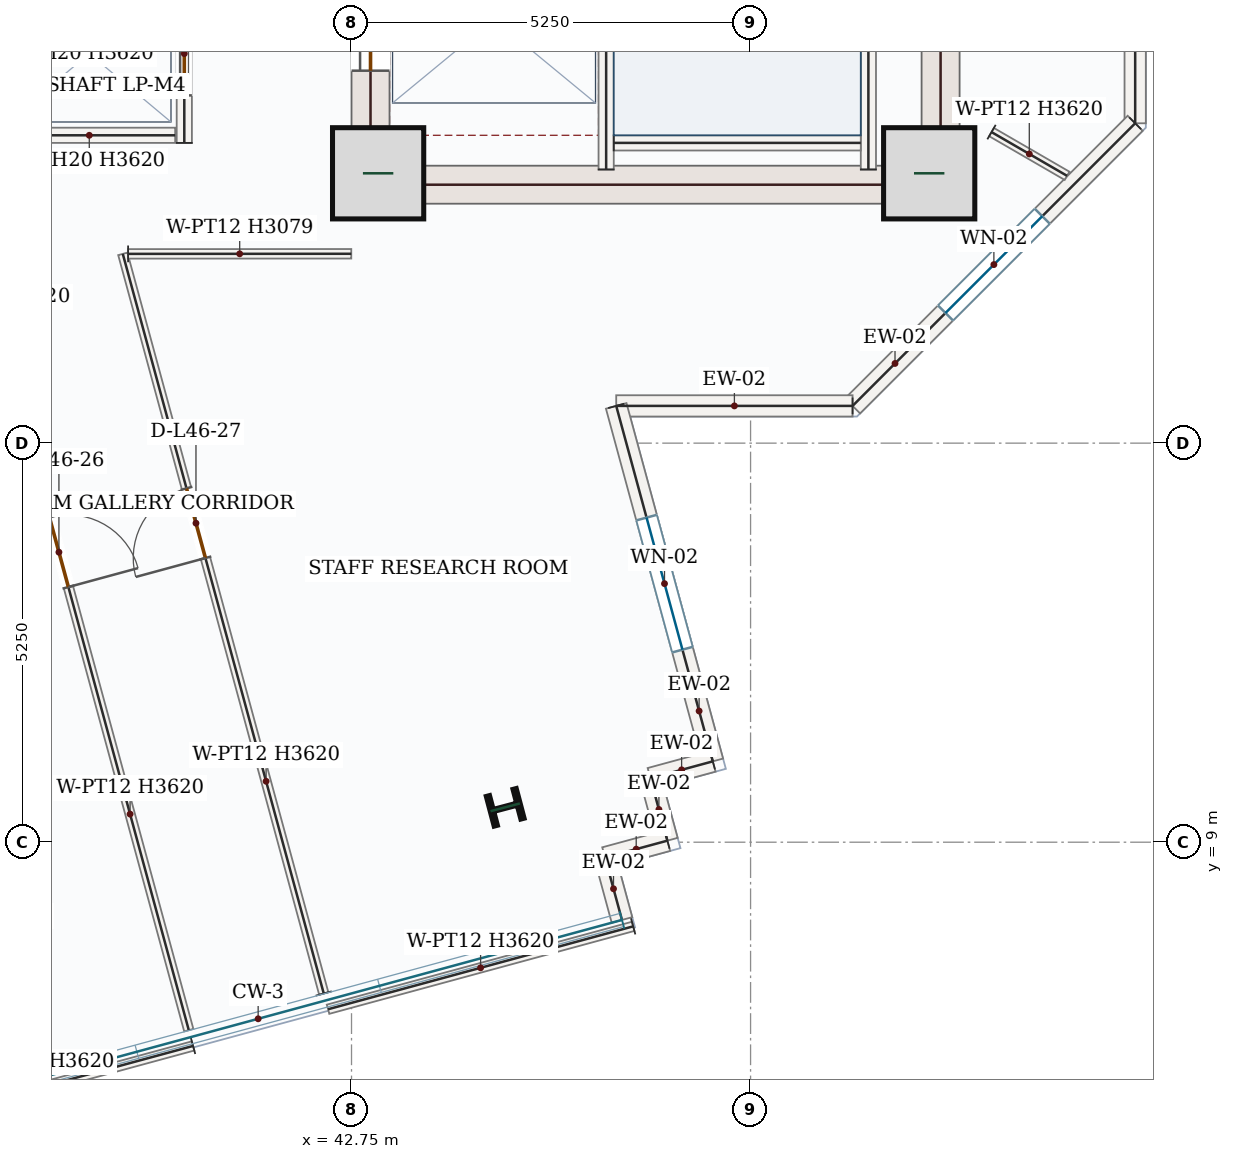
"""IFC4 building model, lengths in metres.
Left out: names, types, materials, properties, quantities, classifications, styles, units other than length and angle.
Written with IfcOpenShell. Run it as: python <this file> out.ifc"""

import sys

from ifc_helpers import new_model, si_unit, direction, frame, frame_2d, origin, origin_2d, place, context, subcontext, project, spatial, rectangle, i_section, extrude, source, transform, mapped, element, fill, save


model = new_model("IFC4")
c1 = context("Model", 3, precision=1e-05, world=origin(), true_north=direction((0.0, 1.0)))
c2 = subcontext(c1, "Body", "Model", "MODEL_VIEW")
j1 = project(units=[si_unit("LENGTHUNIT", "METRE"), si_unit("PLANEANGLEUNIT", "RADIAN")], contexts=[c1])
p1 = place(None, origin())
s1 = spatial("IfcSite", under=j1, at=p1, CompositionType="ELEMENT")
p2 = place(p1, origin())
s2 = spatial("IfcBuilding", under=s1, at=p2, CompositionType="ELEMENT")
p3 = place(p2, frame((0.0, 0.0, 198.0)))
s3 = spatial("IfcBuildingStorey", under=s2, at=p3, CompositionType="ELEMENT", Elevation=198.0)
p4 = place(p3, frame((43.0, 17.4, 0.0), z_axis=(0.0, 0.0, 1.0), x_axis=(0.0, 1.0, 0.0)))
e1 = element("IfcWall", 1, at=p4, inside=s3, PredefinedType="SHEAR", context=c2, shape_type="SweptSolid", body=[
    extrude(rectangle(XDim=8.55, YDim=0.5, at=frame_2d((4.275, 0.0))), origin(), (0.0, 0.0, 1.0), 3.62),
])
p5 = place(p4, frame((6.65, 0.0, 0.0)))
e2 = element("IfcOpeningElement", 2, at=p5, cuts=e1, PredefinedType="OPENING", context=c2, shape_type="SweptSolid", body=[
    extrude(rectangle(XDim=1.1, YDim=2.2, at=frame_2d((0.55, 1.1))), frame((0.0, 0.26, 0.0), z_axis=(0.0, -1.0, 0.0), x_axis=(1.0, 0.0, 0.0)), (0.0, 0.0, 1.0), 0.52),
])
p6 = place(p4, frame((1.75, 0.0, 0.0)))
e3 = element("IfcOpeningElement", 3, at=p6, cuts=e1, PredefinedType="OPENING", context=c2, shape_type="SweptSolid", body=[
    extrude(rectangle(XDim=1.3, YDim=2.2, at=frame_2d((0.65, 1.1))), frame((0.0, 0.26, 0.0), z_axis=(0.0, -1.0, 0.0), x_axis=(1.0, 0.0, 0.0)), (0.0, 0.0, 1.0), 0.52),
])
p7 = place(p4, frame((4.55, 0.0, 0.0)))
e4 = element("IfcOpeningElement", 4, at=p7, cuts=e1, PredefinedType="OPENING", context=c2, shape_type="SweptSolid", body=[
    extrude(rectangle(XDim=0.88, YDim=2.1, at=frame_2d((0.44, 1.05))), frame((0.0, 0.26, 0.0), z_axis=(0.0, -1.0, 0.0), x_axis=(1.0, 0.0, 0.0)), (0.0, 0.0, 1.0), 0.52),
])
m1 = source(origin(), c2, "Body", "SweptSolid", [
    extrude(rectangle(XDim=8.55, YDim=0.5, at=frame_2d((4.275, 0.0))), origin(), (0.0, 0.0, 1.0), 3.62),
])
p8 = place(p3, frame((50.5, 17.4, 0.0), z_axis=(0.0, 0.0, 1.0), x_axis=(0.0, 1.0, 0.0)))
e5 = element("IfcWall", 5, at=p8, inside=s3, PredefinedType="SHEAR", context=c2, shape_type="MappedRepresentation", body=[
    mapped(m1, transform((0.0, 0.0, 0.0), x_axis=(1.0, 0.0, 0.0), y_axis=(0.0, 1.0, 0.0), z_axis=(0.0, 0.0, 1.0), scale=1.0)),
])
m2 = source(origin(), c2, "Body", "SweptSolid", [
    extrude(rectangle(XDim=7.0, YDim=0.5, at=frame_2d((3.5, 0.0))), origin(), (0.0, 0.0, 1.0), 3.62),
])
p9 = place(p3, frame((43.25, 17.65, 0.0), z_axis=(0.0, 0.0, 1.0), x_axis=(1.0, 0.0, 0.0)))
e6 = element("IfcWall", 6, at=p9, inside=s3, PredefinedType="SHEAR", context=c2, shape_type="MappedRepresentation", body=[
    mapped(m2, transform((0.0, 0.0, 0.0), x_axis=(1.0, 0.0, 0.0), y_axis=(0.0, 1.0, 0.0), z_axis=(0.0, 0.0, 1.0), scale=1.0)),
])
m3 = source(origin(), c2, "Body", "SweptSolid", [
    extrude(rectangle(XDim=1.2, YDim=1.2, at=origin_2d()), origin(), (0.0, 0.0, 1.0), 3.9),
])
for number, where, z_axis, x_axis in (
    (7, (43.1, 17.8, 0.0), (0.0, 0.0, 1.0), (1.0, 0.0, 0.0)),
    (8, (50.35, 17.8, 0.0), (0.0, 0.0, 1.0), (1.0, 0.0, 0.0)),
):
    element("IfcColumn", number, at=place(p3, frame(where, z_axis=z_axis, x_axis=x_axis)), inside=s3, PredefinedType="COLUMN", context=c2, shape_type="MappedRepresentation", body=[
        mapped(m3, transform((0.0, 0.0, 0.0), x_axis=(1.0, 0.0, 0.0), y_axis=(0.0, 1.0, 0.0), z_axis=(0.0, 0.0, 1.0), scale=1.0)),
    ])
m4 = source(origin(), c2, "Body", "SweptSolid", [
    extrude(i_section(OverallWidth=0.404, OverallDepth=0.407, WebThickness=0.027, FlangeThickness=0.044, FilletRadius=0.018, at=origin_2d()), origin(), (0.0, 0.0, 1.0), 3.9),
])
p10 = place(p3, frame((44.772, 9.459, 0.0), z_axis=(0.0, 0.0, 1.0), x_axis=(-0.255445757936, 0.966823388604, 0.0)))
e9 = element("IfcColumn", 9, at=p10, inside=s3, PredefinedType="COLUMN", context=c2, shape_type="MappedRepresentation", body=[
    mapped(m4, transform((0.0, 0.0, 0.0), x_axis=(1.0, 0.0, 0.0), y_axis=(0.0, 1.0, 0.0), z_axis=(0.0, 0.0, 1.0), scale=1.0)),
])
p11 = place(p3, frame((53.06, 24.734, 0.0), z_axis=(0.0, 0.0, 1.0), x_axis=(0.0, -1.0, 0.0)))
e10 = element("IfcWall", 10, at=p11, inside=s3, PredefinedType="SOLIDWALL", context=c2, shape_type="SweptSolid", body=[
    extrude(rectangle(XDim=6.276, YDim=0.28, at=frame_2d((3.138, 0.0))), origin(), (0.0, 0.0, 1.0), 3.62),
])
p12 = place(p11, frame((2.238, 0.0, 0.85)))
e11 = element("IfcOpeningElement", 11, at=p12, cuts=e10, PredefinedType="OPENING", context=c2, shape_type="SweptSolid", body=[
    extrude(rectangle(XDim=1.8, YDim=1.75, at=frame_2d((0.9, 0.875))), frame((0.0, 0.15, 0.0), z_axis=(0.0, -1.0, 0.0), x_axis=(1.0, 0.0, 0.0)), (0.0, 0.0, 1.0), 0.3),
])
p13 = place(p3, frame((53.06, 18.458, 0.0), z_axis=(0.0, 0.0, 1.0), x_axis=(-0.707106781187, -0.707106781187, 0.0)))
e12 = element("IfcWall", 12, at=p13, inside=s3, PredefinedType="SOLIDWALL", context=c2, shape_type="SweptSolid", body=[
    extrude(rectangle(XDim=5.258, YDim=0.28, at=frame_2d((2.629, 0.0))), origin(), (0.0, 0.0, 1.0), 3.62),
])
p14 = place(p13, frame((1.729, 0.0, 0.85)))
e13 = element("IfcOpeningElement", 13, at=p14, cuts=e12, PredefinedType="OPENING", context=c2, shape_type="SweptSolid", body=[
    extrude(rectangle(XDim=1.8, YDim=1.75, at=frame_2d((0.9, 0.875))), frame((0.0, 0.15, 0.0), z_axis=(0.0, -1.0, 0.0), x_axis=(1.0, 0.0, 0.0)), (0.0, 0.0, 1.0), 0.3),
])
m5 = source(origin(), c2, "Body", "SweptSolid", [
    extrude(rectangle(XDim=3.11, YDim=0.28, at=frame_2d((1.555, 0.0))), origin(), (0.0, 0.0, 1.0), 3.62),
])
p15 = place(p3, frame((49.342, 14.74, 0.0), z_axis=(0.0, 0.0, 1.0), x_axis=(-1.0, 0.0, 0.0)))
e14 = element("IfcWall", 14, at=p15, inside=s3, PredefinedType="SOLIDWALL", context=c2, shape_type="MappedRepresentation", body=[
    mapped(m5, transform((0.0, 0.0, 0.0), x_axis=(1.0, 0.0, 0.0), y_axis=(0.0, 1.0, 0.0), z_axis=(0.0, 0.0, 1.0), scale=1.0)),
])
p16 = place(p3, frame((46.232, 14.74, 0.0), z_axis=(0.0, 0.0, 1.0), x_axis=(0.262175182741, -0.965020296965, 0.0)))
e15 = element("IfcWall", 15, at=p16, inside=s3, PredefinedType="SOLIDWALL", context=c2, shape_type="SweptSolid", body=[
    extrude(rectangle(XDim=4.846, YDim=0.28, at=frame_2d((2.423, 0.0))), origin(), (0.0, 0.0, 1.0), 3.62),
])
p17 = place(p16, frame((1.523, 0.0, 0.85)))
e16 = element("IfcOpeningElement", 16, at=p17, cuts=e15, PredefinedType="OPENING", context=c2, shape_type="SweptSolid", body=[
    extrude(rectangle(XDim=1.8, YDim=1.75, at=frame_2d((0.9, 0.875))), frame((0.0, 0.15, 0.0), z_axis=(0.0, -1.0, 0.0), x_axis=(1.0, 0.0, 0.0)), (0.0, 0.0, 1.0), 0.3),
])
m6 = source(origin(), c2, "Body", "SweptSolid", [
    extrude(rectangle(XDim=0.85, YDim=0.28, at=frame_2d((0.425, 0.0))), origin(), (0.0, 0.0, 1.0), 3.62),
])
for number, where, z_axis, x_axis in (
    (17, (47.503, 10.063, 0.0), (0.0, 0.0, 1.0), (-0.965, -0.262, 0.0)),
    (18, (46.683, 9.841, 0.0), (0.0, 0.0, 1.0), (0.262, -0.965, 0.0)),
    (19, (46.906, 9.02, 0.0), (0.0, 0.0, 1.0), (-0.965, -0.262, 0.0)),
    (20, (46.085, 8.798, 0.0), (0.0, 0.0, 1.0), (0.262, -0.965, 0.0)),
):
    element("IfcWall", number, at=place(p3, frame(where, z_axis=z_axis, x_axis=x_axis)), inside=s3, PredefinedType="SOLIDWALL", context=c2, shape_type="MappedRepresentation", body=[
        mapped(m6, transform((0.0, 0.0, 0.0), x_axis=(1.0, 0.0, 0.0), y_axis=(0.0, 1.0, 0.0), z_axis=(0.0, 0.0, 1.0), scale=1.0)),
    ])
m7 = source(origin(), c2, "Body", "SweptSolid", [
    extrude(rectangle(XDim=7.87, YDim=0.2, at=frame_2d((3.935, 0.0))), origin(), (0.0, 0.0, 1.0), 3.62),
])
p18 = place(p3, frame((49.55, 17.85, 0.0), z_axis=(0.0, 0.0, 1.0), x_axis=(0.0, 1.0, 0.0)))
e21 = element("IfcWall", 21, at=p18, inside=s3, PredefinedType="SOLIDWALL", context=c2, shape_type="MappedRepresentation", body=[
    mapped(m7, transform((0.0, 0.0, 0.0), x_axis=(1.0, 0.0, 0.0), y_axis=(0.0, 1.0, 0.0), z_axis=(0.0, 0.0, 1.0), scale=1.0)),
])
p19 = place(p3, frame((46.1, 17.85, 0.0), z_axis=(0.0, 0.0, 1.0), x_axis=(0.0, 1.0, 0.0)))
e22 = element("IfcWall", 22, at=p19, inside=s3, PredefinedType="SOLIDWALL", context=c2, shape_type="SweptSolid", body=[
    extrude(rectangle(XDim=8.0, YDim=0.2, at=frame_2d((4.0, 0.0))), origin(), (0.0, 0.0, 1.0), 3.62),
])
p20 = place(p19, frame((6.3, 0.0, 0.0)))
e23 = element("IfcOpeningElement", 23, at=p20, cuts=e22, PredefinedType="OPENING", context=c2, shape_type="SweptSolid", body=[
    extrude(rectangle(XDim=1.05, YDim=2.15, at=frame_2d((0.525, 1.075))), frame((0.0, 0.11, 0.0), z_axis=(0.0, -1.0, 0.0), x_axis=(1.0, 0.0, 0.0)), (0.0, 0.0, 1.0), 0.22),
])
m8 = source(origin(), c2, "Body", "SweptSolid", [
    extrude(rectangle(XDim=3.25, YDim=0.2, at=frame_2d((1.625, 0.0))), origin(), (0.0, 0.0, 1.0), 3.62),
])
p21 = place(p3, frame((46.2, 18.2, 0.0), z_axis=(0.0, 0.0, 1.0), x_axis=(1.0, 0.0, 0.0)))
e24 = element("IfcWall", 24, at=p21, inside=s3, PredefinedType="SOLIDWALL", context=c2, shape_type="MappedRepresentation", body=[
    mapped(m8, transform((0.0, 0.0, 0.0), x_axis=(1.0, 0.0, 0.0), y_axis=(0.0, 1.0, 0.0), z_axis=(0.0, 0.0, 1.0), scale=1.0)),
])
p22 = place(p3, frame((40.55, 18.2, 0.0), z_axis=(0.0, 0.0, 1.0), x_axis=(0.0, 1.0, 0.0)))
e25 = element("IfcWall", 25, at=p22, inside=s3, PredefinedType="SOLIDWALL", context=c2, shape_type="SweptSolid", body=[
    extrude(rectangle(XDim=2.35, YDim=0.2, at=frame_2d((1.175, 0.0))), origin(), (0.0, 0.0, 1.0), 3.62),
])
p23 = place(p22, frame((0.625, 0.0, 0.0)))
e26 = element("IfcOpeningElement", 26, at=p23, cuts=e25, PredefinedType="OPENING", context=c2, shape_type="SweptSolid", body=[
    extrude(rectangle(XDim=1.1, YDim=2.15, at=frame_2d((0.55, 1.075))), frame((0.0, 0.11, 0.0), z_axis=(0.0, -1.0, 0.0), x_axis=(1.0, 0.0, 0.0)), (0.0, 0.0, 1.0), 0.22),
])
m9 = source(origin(), c2, "Body", "SweptSolid", [
    extrude(rectangle(XDim=2.26, YDim=0.2, at=frame_2d((1.13, 0.0))), origin(), (0.0, 0.0, 1.0), 3.62),
])
p24 = place(p3, frame((38.17, 18.3, 0.0), z_axis=(0.0, 0.0, 1.0), x_axis=(1.0, 0.0, 0.0)))
e27 = element("IfcWall", 27, at=p24, inside=s3, PredefinedType="SOLIDWALL", context=c2, shape_type="MappedRepresentation", body=[
    mapped(m9, transform((0.0, 0.0, 0.0), x_axis=(1.0, 0.0, 0.0), y_axis=(0.0, 1.0, 0.0), z_axis=(0.0, 0.0, 1.0), scale=1.0)),
])
p25 = place(p3, frame((38.329, 14.918, 0.0), z_axis=(0.0, 0.0, 1.0), x_axis=(0.262166936223, -0.965022537328, 0.0)))
e28 = element("IfcWall", 28, at=p25, inside=s3, PredefinedType="PARTITIONING", context=c2, shape_type="SweptSolid", body=[
    extrude(rectangle(XDim=8.695, YDim=0.125, at=frame_2d((4.348, 0.0))), origin(), (0.0, 0.0, 1.0), 3.62),
])
p26 = place(p25, frame((1.704, 0.0, 0.0)))
e29 = element("IfcOpeningElement", 29, at=p26, cuts=e28, PredefinedType="OPENING", context=c2, shape_type="SweptSolid", body=[
    extrude(rectangle(XDim=0.95, YDim=2.15, at=frame_2d((0.475, 1.075))), frame((0.0, 0.073, 0.0), z_axis=(0.0, -1.0, 0.0), x_axis=(1.0, 0.0, 0.0)), (0.0, 0.0, 1.0), 0.145),
])
m10 = source(origin(), c2, "Body", "SweptSolid", [
    extrude(rectangle(XDim=4.16, YDim=0.125, at=frame_2d((2.08, 0.0))), origin(), (0.0, 0.0, 1.0), 3.62),
])
p27 = place(p3, frame((40.665, 6.32, 0.0), z_axis=(0.0, 0.0, 1.0), x_axis=(-0.965023387541, -0.262163806614, 0.0)))
e30 = element("IfcWall", 30, at=p27, inside=s3, PredefinedType="PARTITIONING", context=c2, shape_type="MappedRepresentation", body=[
    mapped(m10, transform((0.0, 0.0, 0.0), x_axis=(1.0, 0.0, 0.0), y_axis=(0.0, 1.0, 0.0), z_axis=(0.0, 0.0, 1.0), scale=1.0)),
])
p28 = place(p3, frame((42.385, 7.01, 0.0), z_axis=(0.0, 0.0, 1.0), x_axis=(-0.262203523108, 0.965012597052, 0.0)))
e31 = element("IfcWall", 31, at=p28, inside=s3, PredefinedType="PARTITIONING", context=c2, shape_type="SweptSolid", body=[
    extrude(rectangle(XDim=10.083, YDim=0.125, at=frame_2d((5.042, 0.0))), origin(), (0.0, 0.0, 1.0), 3.62),
])
p29 = place(p28, frame((5.937, 0.0, 0.0)))
e32 = element("IfcOpeningElement", 32, at=p29, cuts=e31, PredefinedType="OPENING", context=c2, shape_type="SweptSolid", body=[
    extrude(rectangle(XDim=0.95, YDim=2.15, at=frame_2d((0.475, 1.075))), frame((0.0, 0.073, 0.0), z_axis=(0.0, -1.0, 0.0), x_axis=(1.0, 0.0, 0.0)), (0.0, 0.0, 1.0), 0.145),
])
m11 = source(origin(), c2, "Body", "SweptSolid", [
    extrude(rectangle(XDim=2.936, YDim=0.125, at=frame_2d((1.468, 0.0))), origin(), (0.0, 0.0, 1.0), 3.079),
])
p30 = place(p3, frame((39.811, 16.74, 0.0), z_axis=(0.0, 0.0, 1.0), x_axis=(0.999999913555, 0.00041580038, 0.0)))
e33 = element("IfcWall", 33, at=p30, inside=s3, PredefinedType="PARTITIONING", context=c2, shape_type="MappedRepresentation", body=[
    mapped(m11, transform((0.0, 0.0, 0.0), x_axis=(1.0, 0.0, 0.0), y_axis=(0.0, 1.0, 0.0), z_axis=(0.0, 0.0, 1.0), scale=1.0)),
])
m12 = source(origin(), c2, "Body", "SweptSolid", [
    extrude(rectangle(XDim=1.148, YDim=0.125, at=frame_2d((0.574, 0.0))), origin(), (0.0, 0.0, 1.0), 3.62),
])
p31 = place(p3, frame((51.17, 18.342, 0.0), z_axis=(0.0, 0.0, 1.0), x_axis=(0.865416582459, -0.501053029933, 0.0)))
e34 = element("IfcWall", 34, at=p31, inside=s3, PredefinedType="PARTITIONING", context=c2, shape_type="MappedRepresentation", body=[
    mapped(m12, transform((0.0, 0.0, 0.0), x_axis=(1.0, 0.0, 0.0), y_axis=(0.0, 1.0, 0.0), z_axis=(0.0, 0.0, 1.0), scale=1.0)),
])
p32 = place(p3, frame((46.455, 7.893, 0.0), z_axis=(0.0, 0.0, 1.0), x_axis=(-0.965023387541, -0.262163806614, 0.0)))
e35 = element("IfcWall", 35, at=p32, inside=s3, PredefinedType="PARTITIONING", context=c2, shape_type="MappedRepresentation", body=[
    mapped(m10, transform((0.0, 0.0, 0.0), x_axis=(1.0, 0.0, 0.0), y_axis=(0.0, 1.0, 0.0), z_axis=(0.0, 0.0, 1.0), scale=1.0)),
])
m13 = source(origin(), c2, "Body", "SweptSolid", [
    extrude(rectangle(XDim=1.8, YDim=1.75, at=frame_2d((0.9, 0.875))), frame((0.0, 0.03, 0.0), z_axis=(0.0, -1.0, 0.0), x_axis=(1.0, 0.0, 0.0)), (0.0, 0.0, 1.0), 0.06),
])
p33 = place(p14, origin())
e36 = element("IfcWindow", 36, at=p33, inside=s3, PartitioningType="DOUBLE_PANEL_VERTICAL", PredefinedType="WINDOW", context=c2, shape_type="MappedRepresentation", body=[
    mapped(m13, transform((0.0, 0.0, 0.0), x_axis=(1.0, 0.0, 0.0), y_axis=(0.0, 1.0, 0.0), z_axis=(0.0, 0.0, 1.0), scale=1.0)),
])
fill(e13, e36)
p34 = place(p17, origin())
e37 = element("IfcWindow", 37, at=p34, inside=s3, PartitioningType="DOUBLE_PANEL_VERTICAL", PredefinedType="WINDOW", context=c2, shape_type="MappedRepresentation", body=[
    mapped(m13, transform((0.0, 0.0, 0.0), x_axis=(1.0, 0.0, 0.0), y_axis=(0.0, 1.0, 0.0), z_axis=(0.0, 0.0, 1.0), scale=1.0)),
])
fill(e16, e37)
m14 = source(origin(), c2, "Body", "SweptSolid", [
    extrude(rectangle(XDim=1.3, YDim=2.2, at=frame_2d((0.65, 1.1))), frame((0.0, 0.025, 0.0), z_axis=(0.0, -1.0, 0.0), x_axis=(1.0, 0.0, 0.0)), (0.0, 0.0, 1.0), 0.05),
])
p35 = place(p6, origin())
e38 = element("IfcDoor", 38, at=p35, inside=s3, OperationType="DOUBLE_DOOR_SLIDING", PredefinedType="DOOR", context=c2, shape_type="MappedRepresentation", body=[
    mapped(m14, transform((0.0, 0.0, 0.0), x_axis=(1.0, 0.0, 0.0), y_axis=(0.0, 1.0, 0.0), z_axis=(0.0, 0.0, 1.0), scale=1.0)),
])
fill(e3, e38)
m15 = source(origin(), c2, "Body", "SweptSolid", [
    extrude(rectangle(XDim=1.1, YDim=2.15, at=frame_2d((0.55, 1.075))), frame((0.0, 0.025, 0.0), z_axis=(0.0, -1.0, 0.0), x_axis=(1.0, 0.0, 0.0)), (0.0, 0.0, 1.0), 0.05),
])
p36 = place(p23, origin())
e39 = element("IfcDoor", 39, at=p36, inside=s3, OperationType="DOUBLE_DOOR_SLIDING", PredefinedType="DOOR", context=c2, shape_type="MappedRepresentation", body=[
    mapped(m15, transform((0.0, 0.0, 0.0), x_axis=(1.0, 0.0, 0.0), y_axis=(0.0, 1.0, 0.0), z_axis=(0.0, 0.0, 1.0), scale=1.0)),
])
fill(e26, e39)
m16 = source(origin(), c2, "Body", "SweptSolid", [
    extrude(rectangle(XDim=0.95, YDim=2.15, at=frame_2d((0.475, 1.075))), frame((0.0, 0.025, 0.0), z_axis=(0.0, -1.0, 0.0), x_axis=(1.0, 0.0, 0.0)), (0.0, 0.0, 1.0), 0.05),
])
p37 = place(p26, origin())
e40 = element("IfcDoor", 40, at=p37, inside=s3, OperationType="SINGLE_SWING_RIGHT", PredefinedType="DOOR", context=c2, shape_type="MappedRepresentation", body=[
    mapped(m16, transform((0.0, 0.0, 0.0), x_axis=(1.0, 0.0, 0.0), y_axis=(0.0, 1.0, 0.0), z_axis=(0.0, 0.0, 1.0), scale=1.0)),
])
fill(e29, e40)
p38 = place(p29, origin())
e41 = element("IfcDoor", 41, at=p38, inside=s3, OperationType="SINGLE_SWING_LEFT", PredefinedType="DOOR", context=c2, shape_type="MappedRepresentation", body=[
    mapped(m16, transform((0.0, 0.0, 0.0), x_axis=(1.0, 0.0, 0.0), y_axis=(0.0, 1.0, 0.0), z_axis=(0.0, 0.0, 1.0), scale=1.0)),
])
fill(e32, e41)
save(model, sys.argv[1])
